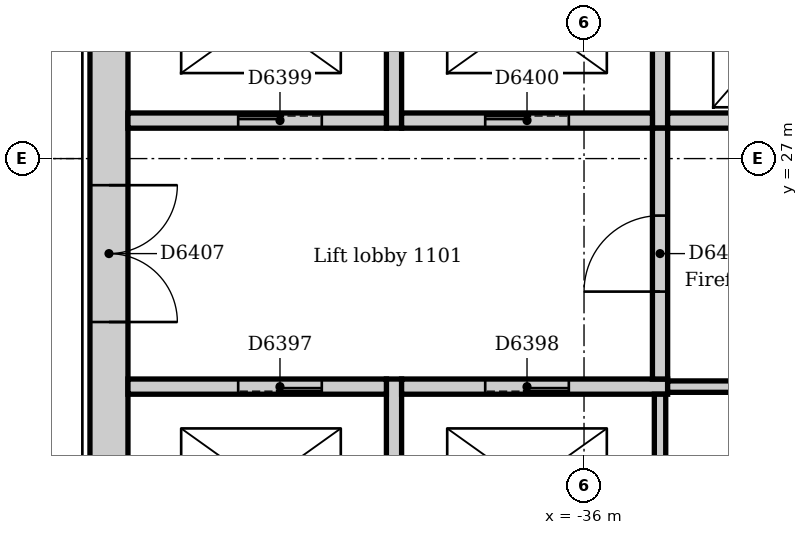
"""IFC4 building model, lengths in metres.
Left out: names, types, materials, properties, quantities, classifications, styles, units other than length and angle.
Written with IfcOpenShell. Run it as: python <this file> out.ifc"""

import sys

from ifc_helpers import new_model, si_unit, direction, frame, frame_2d, origin, place, context, subcontext, project, spatial, rectangle, extrude, element, fill, save


model = new_model("IFC4")
c1 = context("Model", 3, precision=1e-05, world=origin(), true_north=direction((0.0, 1.0)))
c2 = subcontext(c1, "Body", "Model", "MODEL_VIEW")
j1 = project(units=[si_unit("LENGTHUNIT", "METRE"), si_unit("PLANEANGLEUNIT", "RADIAN")], contexts=[c1])
p1 = place(None, origin())
s1 = spatial("IfcSite", under=j1, at=p1, CompositionType="ELEMENT")
p2 = place(p1, origin())
s2 = spatial("IfcBuilding", under=s1, at=p2, CompositionType="ELEMENT")
p3 = place(p2, frame((0.0, 0.0, 51.0)))
s3 = spatial("IfcBuildingStorey", under=s2, at=p3, CompositionType="ELEMENT", Elevation=51.0)
p4 = place(p3, frame((-42.25, 30.5, 0.0), z_axis=(0.0, 0.0, 1.0), x_axis=(0.0, -1.0, 0.0)))
e1 = element("IfcWall", 1, at=p4, inside=s3, PredefinedType="SOLIDWALL", context=c2, shape_type="SweptSolid", body=[
    extrude(rectangle(XDim=9.5, YDim=0.5, at=frame_2d((4.75, 0.0))), origin(), (0.0, 0.0, 1.0), 4.0),
])
p5 = place(p4, frame((3.85, 0.0, 0.0)))
e2 = element("IfcOpeningElement", 2, at=p5, cuts=e1, PredefinedType="OPENING", context=c2, shape_type="SweptSolid", body=[
    extrude(rectangle(XDim=1.8, YDim=2.1, at=frame_2d((0.9, 1.05))), frame((0.0, 0.26, 0.0), z_axis=(0.0, -1.0, 0.0), x_axis=(1.0, 0.0, 0.0)), (0.0, 0.0, 1.0), 0.52),
])
p6 = place(p3, frame((-38.5, 21.0, 0.0), z_axis=(0.0, 0.0, 1.0), x_axis=(0.0, 1.0, 0.0)))
e3 = element("IfcWall", 3, at=p6, inside=s3, PredefinedType="SOLIDWALL", context=c2, shape_type="SweptSolid", body=[
    extrude(rectangle(XDim=3.1, YDim=0.2, at=frame_2d((1.55, 0.0))), origin(), (0.0, 0.0, 1.0), 4.0),
])
p7 = place(p3, frame((-38.6, 24.0, 0.0), z_axis=(0.0, 0.0, 1.0), x_axis=(-1.0, 0.0, 0.0)))
e4 = element("IfcWall", 4, at=p7, inside=s3, PredefinedType="SOLIDWALL", context=c2, shape_type="SweptSolid", body=[
    extrude(rectangle(XDim=3.4, YDim=0.2, at=frame_2d((1.7, 0.0))), origin(), (0.0, 0.0, 1.0), 4.0),
])
p8 = place(p7, frame((0.85, 0.0, 0.0)))
e5 = element("IfcOpeningElement", 5, at=p8, cuts=e4, PredefinedType="OPENING", context=c2, shape_type="SweptSolid", body=[
    extrude(rectangle(XDim=1.1, YDim=2.1, at=frame_2d((0.55, 1.05))), frame((0.0, 0.11, 0.0), z_axis=(0.0, -1.0, 0.0), x_axis=(1.0, 0.0, 0.0)), (0.0, 0.0, 1.0), 0.22),
])
p9 = place(p3, frame((-34.9, 24.0, 0.0), z_axis=(0.0, 0.0, 1.0), x_axis=(-1.0, 0.0, 0.0)))
e6 = element("IfcWall", 6, at=p9, inside=s3, PredefinedType="SOLIDWALL", context=c2, shape_type="SweptSolid", body=[
    extrude(rectangle(XDim=3.5, YDim=0.2, at=frame_2d((1.75, 0.0))), origin(), (0.0, 0.0, 1.0), 4.0),
])
p10 = place(p9, frame((1.3, 0.0, 0.0)))
e7 = element("IfcOpeningElement", 7, at=p10, cuts=e6, PredefinedType="OPENING", context=c2, shape_type="SweptSolid", body=[
    extrude(rectangle(XDim=1.1, YDim=2.1, at=frame_2d((0.55, 1.05))), frame((0.0, 0.11, 0.0), z_axis=(0.0, -1.0, 0.0), x_axis=(1.0, 0.0, 0.0)), (0.0, 0.0, 1.0), 0.22),
])
p11 = place(p3, frame((-38.5, 27.4, 0.0), z_axis=(0.0, 0.0, 1.0), x_axis=(0.0, 1.0, 0.0)))
e8 = element("IfcWall", 8, at=p11, inside=s3, PredefinedType="SOLIDWALL", context=c2, shape_type="SweptSolid", body=[
    extrude(rectangle(XDim=2.85, YDim=0.2, at=frame_2d((1.425, 0.0))), origin(), (0.0, 0.0, 1.0), 4.0),
])
p12 = place(p3, frame((-42.0, 27.5, 0.0), z_axis=(0.0, 0.0, 1.0), x_axis=(1.0, 0.0, 0.0)))
e9 = element("IfcWall", 9, at=p12, inside=s3, PredefinedType="SOLIDWALL", context=c2, shape_type="SweptSolid", body=[
    extrude(rectangle(XDim=3.4, YDim=0.2, at=frame_2d((1.7, 0.0))), origin(), (0.0, 0.0, 1.0), 4.0),
])
p13 = place(p12, frame((1.45, 0.0, 0.0)))
e10 = element("IfcOpeningElement", 10, at=p13, cuts=e9, PredefinedType="OPENING", context=c2, shape_type="SweptSolid", body=[
    extrude(rectangle(XDim=1.1, YDim=2.1, at=frame_2d((0.55, 1.05))), frame((0.0, 0.11, 0.0), z_axis=(0.0, -1.0, 0.0), x_axis=(1.0, 0.0, 0.0)), (0.0, 0.0, 1.0), 0.22),
])
p14 = place(p3, frame((-35.0, 27.4, 0.0), z_axis=(0.0, 0.0, 1.0), x_axis=(0.0, 1.0, 0.0)))
e11 = element("IfcWall", 11, at=p14, inside=s3, PredefinedType="SOLIDWALL", context=c2, shape_type="SweptSolid", body=[
    extrude(rectangle(XDim=2.85, YDim=0.2, at=frame_2d((1.425, 0.0))), origin(), (0.0, 0.0, 1.0), 4.0),
])
p15 = place(p3, frame((-38.4, 27.5, 0.0), z_axis=(0.0, 0.0, 1.0), x_axis=(1.0, 0.0, 0.0)))
e12 = element("IfcWall", 12, at=p15, inside=s3, PredefinedType="SOLIDWALL", context=c2, shape_type="SweptSolid", body=[
    extrude(rectangle(XDim=3.3, YDim=0.2, at=frame_2d((1.65, 0.0))), origin(), (0.0, 0.0, 1.0), 4.0),
])
p16 = place(p15, frame((1.1, 0.0, 0.0)))
e13 = element("IfcOpeningElement", 13, at=p16, cuts=e12, PredefinedType="OPENING", context=c2, shape_type="SweptSolid", body=[
    extrude(rectangle(XDim=1.1, YDim=2.1, at=frame_2d((0.55, 1.05))), frame((0.0, 0.11, 0.0), z_axis=(0.0, -1.0, 0.0), x_axis=(1.0, 0.0, 0.0)), (0.0, 0.0, 1.0), 0.22),
])
p17 = place(p3, frame((-34.9, 27.5, 0.0), z_axis=(0.0, 0.0, 1.0), x_axis=(1.0, 0.0, 0.0)))
e14 = element("IfcWall", 14, at=p17, inside=s3, PredefinedType="SOLIDWALL", context=c2, shape_type="SweptSolid", body=[
    extrude(rectangle(XDim=3.4, YDim=0.2, at=frame_2d((1.7, 0.0))), origin(), (0.0, 0.0, 1.0), 4.0),
])
p18 = place(p17, frame((1.1, 0.0, 0.0)))
e15 = element("IfcOpeningElement", 15, at=p18, cuts=e14, PredefinedType="OPENING", context=c2, shape_type="SweptSolid", body=[
    extrude(rectangle(XDim=1.1, YDim=2.1, at=frame_2d((0.55, 1.05))), frame((0.0, 0.11, 0.0), z_axis=(0.0, -1.0, 0.0), x_axis=(1.0, 0.0, 0.0)), (0.0, 0.0, 1.0), 0.22),
])
p19 = place(p3, frame((-35.0, 24.1, 0.0), z_axis=(0.0, 0.0, 1.0), x_axis=(0.0, 1.0, 0.0)))
e16 = element("IfcWall", 16, at=p19, inside=s3, PredefinedType="SOLIDWALL", context=c2, shape_type="SweptSolid", body=[
    extrude(rectangle(XDim=3.3, YDim=0.2, at=frame_2d((1.65, 0.0))), origin(), (0.0, 0.0, 1.0), 4.0),
])
p20 = place(p19, frame((1.15, 0.0, 0.0)))
e17 = element("IfcOpeningElement", 17, at=p20, cuts=e16, PredefinedType="OPENING", context=c2, shape_type="SweptSolid", body=[
    extrude(rectangle(XDim=1.0, YDim=2.1, at=frame_2d((0.5, 1.05))), frame((0.0, 0.11, 0.0), z_axis=(0.0, -1.0, 0.0), x_axis=(1.0, 0.0, 0.0)), (0.0, 0.0, 1.0), 0.22),
])
p21 = place(p3, frame((-35.0, 21.0, 0.0), z_axis=(0.0, 0.0, 1.0), x_axis=(0.0, 1.0, 0.0)))
e18 = element("IfcWall", 18, at=p21, inside=s3, PredefinedType="SOLIDWALL", context=c2, shape_type="SweptSolid", body=[
    extrude(rectangle(XDim=2.9, YDim=0.15, at=frame_2d((1.45, 0.0))), origin(), (0.0, 0.0, 1.0), 4.0),
])
p22 = place(p3, frame((-31.5, 24.0, 0.0), z_axis=(0.0, 0.0, 1.0), x_axis=(-1.0, 0.0, 0.0)))
e19 = element("IfcWall", 19, at=p22, inside=s3, PredefinedType="SOLIDWALL", context=c2, shape_type="SweptSolid", body=[
    extrude(rectangle(XDim=3.4, YDim=0.15, at=frame_2d((1.7, 0.0))), origin(), (0.0, 0.0, 1.0), 4.0),
])
p23 = place(p8, origin())
e20 = element("IfcDoor", 20, at=p23, inside=s3, OperationType="SLIDING_TO_LEFT", PredefinedType="DOOR", context=c2, shape_type="SweptSolid", body=[
    extrude(rectangle(XDim=1.1, YDim=2.1, at=frame_2d((0.55, 1.05))), frame((0.0, 0.025, 0.0), z_axis=(0.0, -1.0, 0.0), x_axis=(1.0, 0.0, 0.0)), (0.0, 0.0, 1.0), 0.05),
])
fill(e5, e20)
p24 = place(p10, origin())
e21 = element("IfcDoor", 21, at=p24, inside=s3, OperationType="SLIDING_TO_LEFT", PredefinedType="DOOR", context=c2, shape_type="SweptSolid", body=[
    extrude(rectangle(XDim=1.1, YDim=2.1, at=frame_2d((0.55, 1.05))), frame((0.0, 0.025, 0.0), z_axis=(0.0, -1.0, 0.0), x_axis=(1.0, 0.0, 0.0)), (0.0, 0.0, 1.0), 0.05),
])
fill(e7, e21)
p25 = place(p13, origin())
e22 = element("IfcDoor", 22, at=p25, inside=s3, OperationType="SLIDING_TO_LEFT", PredefinedType="DOOR", context=c2, shape_type="SweptSolid", body=[
    extrude(rectangle(XDim=1.1, YDim=2.1, at=frame_2d((0.55, 1.05))), frame((0.0, 0.025, 0.0), z_axis=(0.0, -1.0, 0.0), x_axis=(1.0, 0.0, 0.0)), (0.0, 0.0, 1.0), 0.05),
])
fill(e10, e22)
p26 = place(p16, origin())
e23 = element("IfcDoor", 23, at=p26, inside=s3, OperationType="SLIDING_TO_LEFT", PredefinedType="DOOR", context=c2, shape_type="SweptSolid", body=[
    extrude(rectangle(XDim=1.1, YDim=2.1, at=frame_2d((0.55, 1.05))), frame((0.0, 0.025, 0.0), z_axis=(0.0, -1.0, 0.0), x_axis=(1.0, 0.0, 0.0)), (0.0, 0.0, 1.0), 0.05),
])
fill(e13, e23)
p27 = place(p20, origin())
e24 = element("IfcDoor", 24, at=p27, inside=s3, OperationType="SINGLE_SWING_LEFT", PredefinedType="DOOR", context=c2, shape_type="SweptSolid", body=[
    extrude(rectangle(XDim=1.0, YDim=2.1, at=frame_2d((0.5, 1.05))), frame((0.0, 0.025, 0.0), z_axis=(0.0, -1.0, 0.0), x_axis=(1.0, 0.0, 0.0)), (0.0, 0.0, 1.0), 0.05),
])
fill(e17, e24)
p28 = place(p5, origin())
e25 = element("IfcDoor", 25, at=p28, inside=s3, OperationType="DOUBLE_DOOR_SINGLE_SWING", PredefinedType="DOOR", context=c2, shape_type="SweptSolid", body=[
    extrude(rectangle(XDim=1.8, YDim=2.1, at=frame_2d((0.9, 1.05))), frame((0.0, 0.025, 0.0), z_axis=(0.0, -1.0, 0.0), x_axis=(1.0, 0.0, 0.0)), (0.0, 0.0, 1.0), 0.05),
])
fill(e2, e25)
save(model, sys.argv[1])
